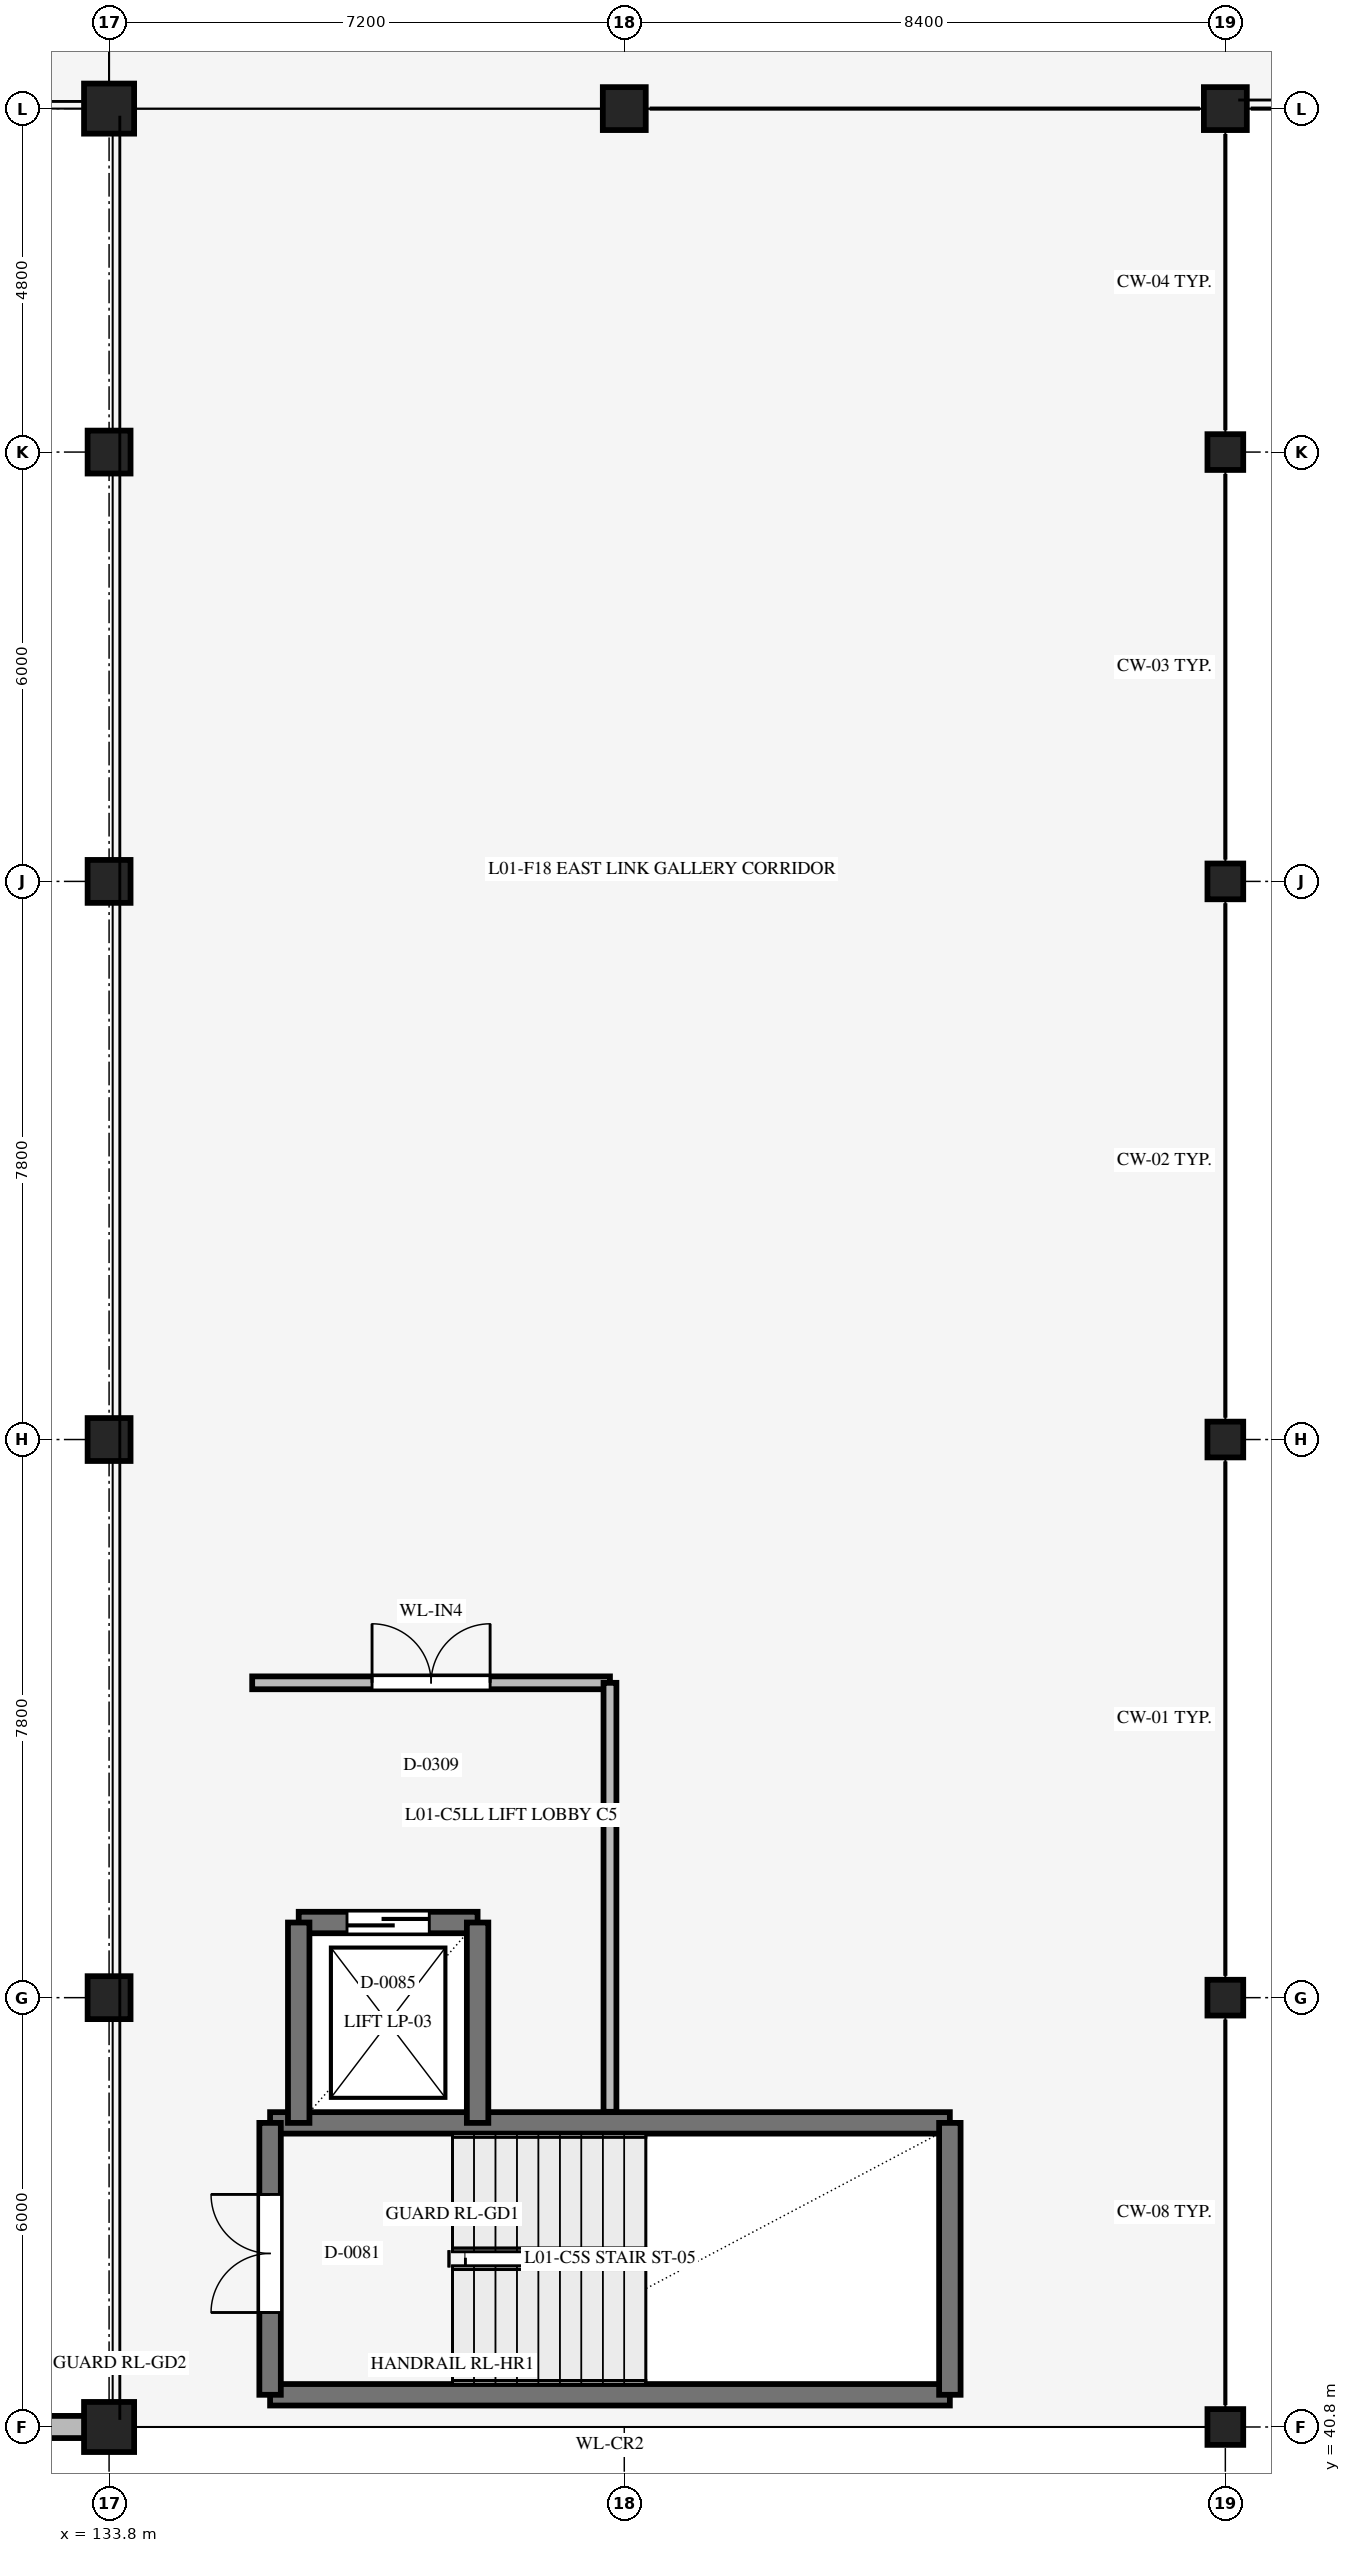
"""IFC4 building model, lengths in metres.
Left out: names, types, materials, properties, quantities, classifications, styles, units other than length and angle.
Written with IfcOpenShell. Run it as: python <this file> out.ifc"""

import sys

from ifc_helpers import new_model, si_unit, direction, frame, frame_2d, origin, origin_2d, place, context, subcontext, project, spatial, rectangle, extrude, element, fill, save


model = new_model("IFC4")
c1 = context("Model", 3, precision=1e-05, world=origin(), true_north=direction((0.0, 1.0)))
c2 = subcontext(c1, "Body", "Model", "MODEL_VIEW")
j1 = project(units=[si_unit("LENGTHUNIT", "METRE"), si_unit("PLANEANGLEUNIT", "RADIAN")], contexts=[c1])
p1 = place(None, origin())
s1 = spatial("IfcSite", under=j1, at=p1, CompositionType="ELEMENT")
p2 = place(p1, origin())
s2 = spatial("IfcBuilding", under=s1, at=p2, CompositionType="ELEMENT")
p3 = place(p2, frame((0.0, 0.0, 6.0)))
s3 = spatial("IfcBuildingStorey", under=s2, at=p3, CompositionType="ELEMENT", Elevation=6.0)
p4 = place(p3, frame((133.8, 40.8, 0.0), z_axis=(0.0, 0.0, 1.0), x_axis=(1.0, 0.0, 0.0)))
e1 = element("IfcColumn", 1, at=p4, inside=s3, PredefinedType="COLUMN", context=c2, shape_type="SweptSolid", body=[
    extrude(rectangle(XDim=0.7, YDim=0.7, at=origin_2d()), origin(), (0.0, 0.0, 1.0), 6.0),
])
for number, where, z_axis, x_axis in (
    (2, (133.8, 46.8, 0.0), (0.0, 0.0, 1.0), (1.0, 0.0, 0.0)),
    (3, (133.8, 54.6, 0.0), (0.0, 0.0, 1.0), (1.0, 0.0, 0.0)),
    (4, (133.8, 62.4, 0.0), (0.0, 0.0, 1.0), (1.0, 0.0, 0.0)),
    (5, (133.8, 68.4, 0.0), (0.0, 0.0, 1.0), (1.0, 0.0, 0.0)),
):
    element("IfcColumn", number, at=place(p3, frame(where, z_axis=z_axis, x_axis=x_axis)), inside=s3, PredefinedType="COLUMN", context=c2, shape_type="SweptSolid", body=[
        extrude(rectangle(XDim=0.6, YDim=0.6, at=origin_2d()), origin(), (0.0, 0.0, 1.0), 6.0),
    ])
p5 = place(p3, frame((133.8, 73.2, 0.0), z_axis=(0.0, 0.0, 1.0), x_axis=(1.0, 0.0, 0.0)))
e6 = element("IfcColumn", 6, at=p5, inside=s3, PredefinedType="COLUMN", context=c2, shape_type="SweptSolid", body=[
    extrude(rectangle(XDim=0.7, YDim=0.7, at=origin_2d()), origin(), (0.0, 0.0, 1.0), 6.0),
])
for number, where, z_axis, x_axis in (
    (7, (141.0, 73.2, 0.0), (0.0, 0.0, 1.0), (1.0, 0.0, 0.0)),
    (8, (149.4, 73.2, 0.0), (0.0, 0.0, 1.0), (1.0, 0.0, 0.0)),
):
    element("IfcColumn", number, at=place(p3, frame(where, z_axis=z_axis, x_axis=x_axis)), inside=s3, PredefinedType="COLUMN", context=c2, shape_type="SweptSolid", body=[
        extrude(rectangle(XDim=0.6, YDim=0.6, at=origin_2d()), origin(), (0.0, 0.0, 1.0), 6.0),
    ])
for number, where, z_axis, x_axis in (
    (9, (149.4, 40.8, 0.0), (0.0, 0.0, 1.0), (1.0, 0.0, 0.0)),
    (10, (149.4, 46.8, 0.0), (0.0, 0.0, 1.0), (1.0, 0.0, 0.0)),
    (11, (149.4, 54.6, 0.0), (0.0, 0.0, 1.0), (1.0, 0.0, 0.0)),
    (12, (149.4, 62.4, 0.0), (0.0, 0.0, 1.0), (1.0, 0.0, 0.0)),
    (13, (149.4, 68.4, 0.0), (0.0, 0.0, 1.0), (1.0, 0.0, 0.0)),
):
    element("IfcColumn", number, at=place(p3, frame(where, z_axis=z_axis, x_axis=x_axis)), inside=s3, PredefinedType="COLUMN", context=c2, shape_type="SweptSolid", body=[
        extrude(rectangle(XDim=0.5, YDim=0.5, at=origin_2d()), origin(), (0.0, 0.0, 1.0), 6.0),
    ])
for number, where, z_axis, x_axis in (
    (14, (145.55, 41.25, 0.0), (0.0, 0.0, 1.0), (-1.0, 0.0, 0.0)),
    (15, (136.05, 45.05, 0.0), (0.0, 0.0, 1.0), (1.0, 0.0, 0.0)),
):
    element("IfcWall", number, at=place(p3, frame(where, z_axis=z_axis, x_axis=x_axis)), inside=s3, PredefinedType="SHEAR", context=c2, shape_type="SweptSolid", body=[
        extrude(rectangle(XDim=9.5, YDim=0.3, at=frame_2d((4.75, 0.0))), origin(), (0.0, 0.0, 1.0), 6.0),
    ])
p6 = place(p3, frame((136.05, 41.25, 0.0), z_axis=(0.0, 0.0, 1.0), x_axis=(0.0, 1.0, 0.0)))
e16 = element("IfcWall", 16, at=p6, inside=s3, PredefinedType="SHEAR", context=c2, shape_type="SweptSolid", body=[
    extrude(rectangle(XDim=3.8, YDim=0.3, at=frame_2d((1.9, 0.0))), origin(), (0.0, 0.0, 1.0), 6.0),
])
p7 = place(p6, frame((1.15, 0.0, 0.0)))
e17 = element("IfcOpeningElement", 17, at=p7, cuts=e16, PredefinedType="OPENING", context=c2, shape_type="SweptSolid", body=[
    extrude(rectangle(XDim=1.65, YDim=2.2, at=frame_2d((0.825, 1.1))), frame((0.0, 0.16, 0.0), z_axis=(0.0, -1.0, 0.0), x_axis=(1.0, 0.0, 0.0)), (0.0, 0.0, 1.0), 0.32),
])
p8 = place(p3, frame((145.55, 41.25, 0.0), z_axis=(0.0, 0.0, 1.0), x_axis=(0.0, 1.0, 0.0)))
e18 = element("IfcWall", 18, at=p8, inside=s3, PredefinedType="SHEAR", context=c2, shape_type="SweptSolid", body=[
    extrude(rectangle(XDim=3.8, YDim=0.3, at=frame_2d((1.9, 0.0))), origin(), (0.0, 0.0, 1.0), 6.0),
])
p9 = place(p3, frame((136.45, 47.85, 0.0), z_axis=(0.0, 0.0, 1.0), x_axis=(1.0, 0.0, 0.0)))
e19 = element("IfcWall", 19, at=p9, inside=s3, PredefinedType="SHEAR", context=c2, shape_type="SweptSolid", body=[
    extrude(rectangle(XDim=2.5, YDim=0.3, at=frame_2d((1.25, 0.0))), origin(), (0.0, 0.0, 1.0), 5.64),
])
p10 = place(p9, frame((0.675, 0.0, 0.0)))
e20 = element("IfcOpeningElement", 20, at=p10, cuts=e19, PredefinedType="OPENING", context=c2, shape_type="SweptSolid", body=[
    extrude(rectangle(XDim=1.15, YDim=2.2, at=frame_2d((0.575, 1.1))), frame((0.0, 0.16, 0.0), z_axis=(0.0, -1.0, 0.0), x_axis=(1.0, 0.0, 0.0)), (0.0, 0.0, 1.0), 0.32),
])
for number, where, z_axis, x_axis in (
    (21, (136.45, 45.05, 0.0), (0.0, 0.0, 1.0), (0.0, 1.0, 0.0)),
    (22, (138.95, 45.05, 0.0), (0.0, 0.0, 1.0), (0.0, 1.0, 0.0)),
):
    element("IfcWall", number, at=place(p3, frame(where, z_axis=z_axis, x_axis=x_axis)), inside=s3, PredefinedType="SHEAR", context=c2, shape_type="SweptSolid", body=[
        extrude(rectangle(XDim=2.8, YDim=0.3, at=frame_2d((1.4, 0.0))), origin(), (0.0, 0.0, 1.0), 5.64),
    ])
p11 = place(p3, frame((133.75, 40.8, -0.05), z_axis=(0.0, 0.0, 1.0), x_axis=(-1.0, 0.0, 0.0)))
e23 = element("IfcWall", 23, at=p11, inside=s3, PredefinedType="STANDARD", context=c2, shape_type="SweptSolid", body=[
    extrude(rectangle(XDim=8.995, YDim=0.31, at=frame_2d((4.498, 0.0))), origin(), (0.0, 0.0, 1.0), 4.521),
])
p12 = place(p2, origin())
s4 = spatial("IfcBuildingStorey", under=s2, at=p12, CompositionType="ELEMENT", Elevation=0.0)
p13 = place(p12, frame((149.4, 40.8, 0.0), z_axis=(0.0, 0.0, 1.0), x_axis=(-1.0, 0.0, 0.0)))
e24 = element("IfcWall", 24, at=p13, inside=s4, PredefinedType="STANDARD", context=c2, shape_type="SweptSolid", body=[
    extrude(rectangle(XDim=15.945, YDim=0.34, at=frame_2d((7.972, 0.0))), origin(), (0.0, 0.0, 1.0), 11.69),
])
p14 = place(p13, frame((1.2, 0.0, 0.0)))
e25 = element("IfcOpeningElement", 25, at=p14, cuts=e24, PredefinedType="OPENING", context=c2, shape_type="SweptSolid", body=[
    extrude(rectangle(XDim=1.8, YDim=2.25, at=frame_2d((0.9, 1.125))), frame((0.0, 0.18, 0.0), z_axis=(0.0, -1.0, 0.0), x_axis=(1.0, 0.0, 0.0)), (0.0, 0.0, 1.0), 0.36),
])
p15 = place(p3, frame((135.8, 51.2, 0.0), z_axis=(0.0, 0.0, 1.0), x_axis=(1.0, 0.0, 0.0)))
e26 = element("IfcWall", 26, at=p15, inside=s3, PredefinedType="STANDARD", context=c2, shape_type="SweptSolid", body=[
    extrude(rectangle(XDim=5.0, YDim=0.18, at=frame_2d((2.5, 0.0))), origin(), (0.0, 0.0, 1.0), 3.15),
])
p16 = place(p15, frame((1.675, 0.0, 0.0)))
e27 = element("IfcOpeningElement", 27, at=p16, cuts=e26, PredefinedType="OPENING", context=c2, shape_type="SweptSolid", body=[
    extrude(rectangle(XDim=1.65, YDim=2.2, at=frame_2d((0.825, 1.1))), frame((0.0, 0.1, 0.0), z_axis=(0.0, -1.0, 0.0), x_axis=(1.0, 0.0, 0.0)), (0.0, 0.0, 1.0), 0.2),
])
p17 = place(p3, frame((140.8, 45.205, 0.0), z_axis=(0.0, 0.0, 1.0), x_axis=(0.0, 1.0, 0.0)))
e28 = element("IfcWall", 28, at=p17, inside=s3, PredefinedType="STANDARD", context=c2, shape_type="SweptSolid", body=[
    extrude(rectangle(XDim=5.995, YDim=0.18, at=frame_2d((2.998, 0.0))), origin(), (0.0, 0.0, 1.0), 3.15),
])
p18 = place(p7, origin())
e29 = element("IfcDoor", 29, at=p18, inside=s3, OperationType="DOUBLE_DOOR_SINGLE_SWING", PredefinedType="DOOR", context=c2, shape_type="SweptSolid", body=[
    extrude(rectangle(XDim=1.65, YDim=2.2, at=frame_2d((0.825, 1.1))), frame((0.0, 0.025, 0.0), z_axis=(0.0, -1.0, 0.0), x_axis=(1.0, 0.0, 0.0)), (0.0, 0.0, 1.0), 0.05),
])
fill(e17, e29)
p19 = place(p10, origin())
e30 = element("IfcDoor", 30, at=p19, inside=s3, OperationType="DOUBLE_DOOR_SLIDING", PredefinedType="DOOR", context=c2, shape_type="SweptSolid", body=[
    extrude(rectangle(XDim=1.15, YDim=2.2, at=frame_2d((0.575, 1.1))), frame((0.0, 0.025, 0.0), z_axis=(0.0, -1.0, 0.0), x_axis=(1.0, 0.0, 0.0)), (0.0, 0.0, 1.0), 0.05),
])
fill(e20, e30)
p20 = place(p16, origin())
e31 = element("IfcDoor", 31, at=p20, inside=s3, OperationType="DOUBLE_DOOR_SINGLE_SWING", PredefinedType="DOOR", context=c2, shape_type="SweptSolid", body=[
    extrude(rectangle(XDim=1.65, YDim=2.2, at=frame_2d((0.825, 1.1))), frame((0.0, 0.025, 0.0), z_axis=(0.0, -1.0, 0.0), x_axis=(1.0, 0.0, 0.0)), (0.0, 0.0, 1.0), 0.05),
])
fill(e27, e31)
save(model, sys.argv[1])
